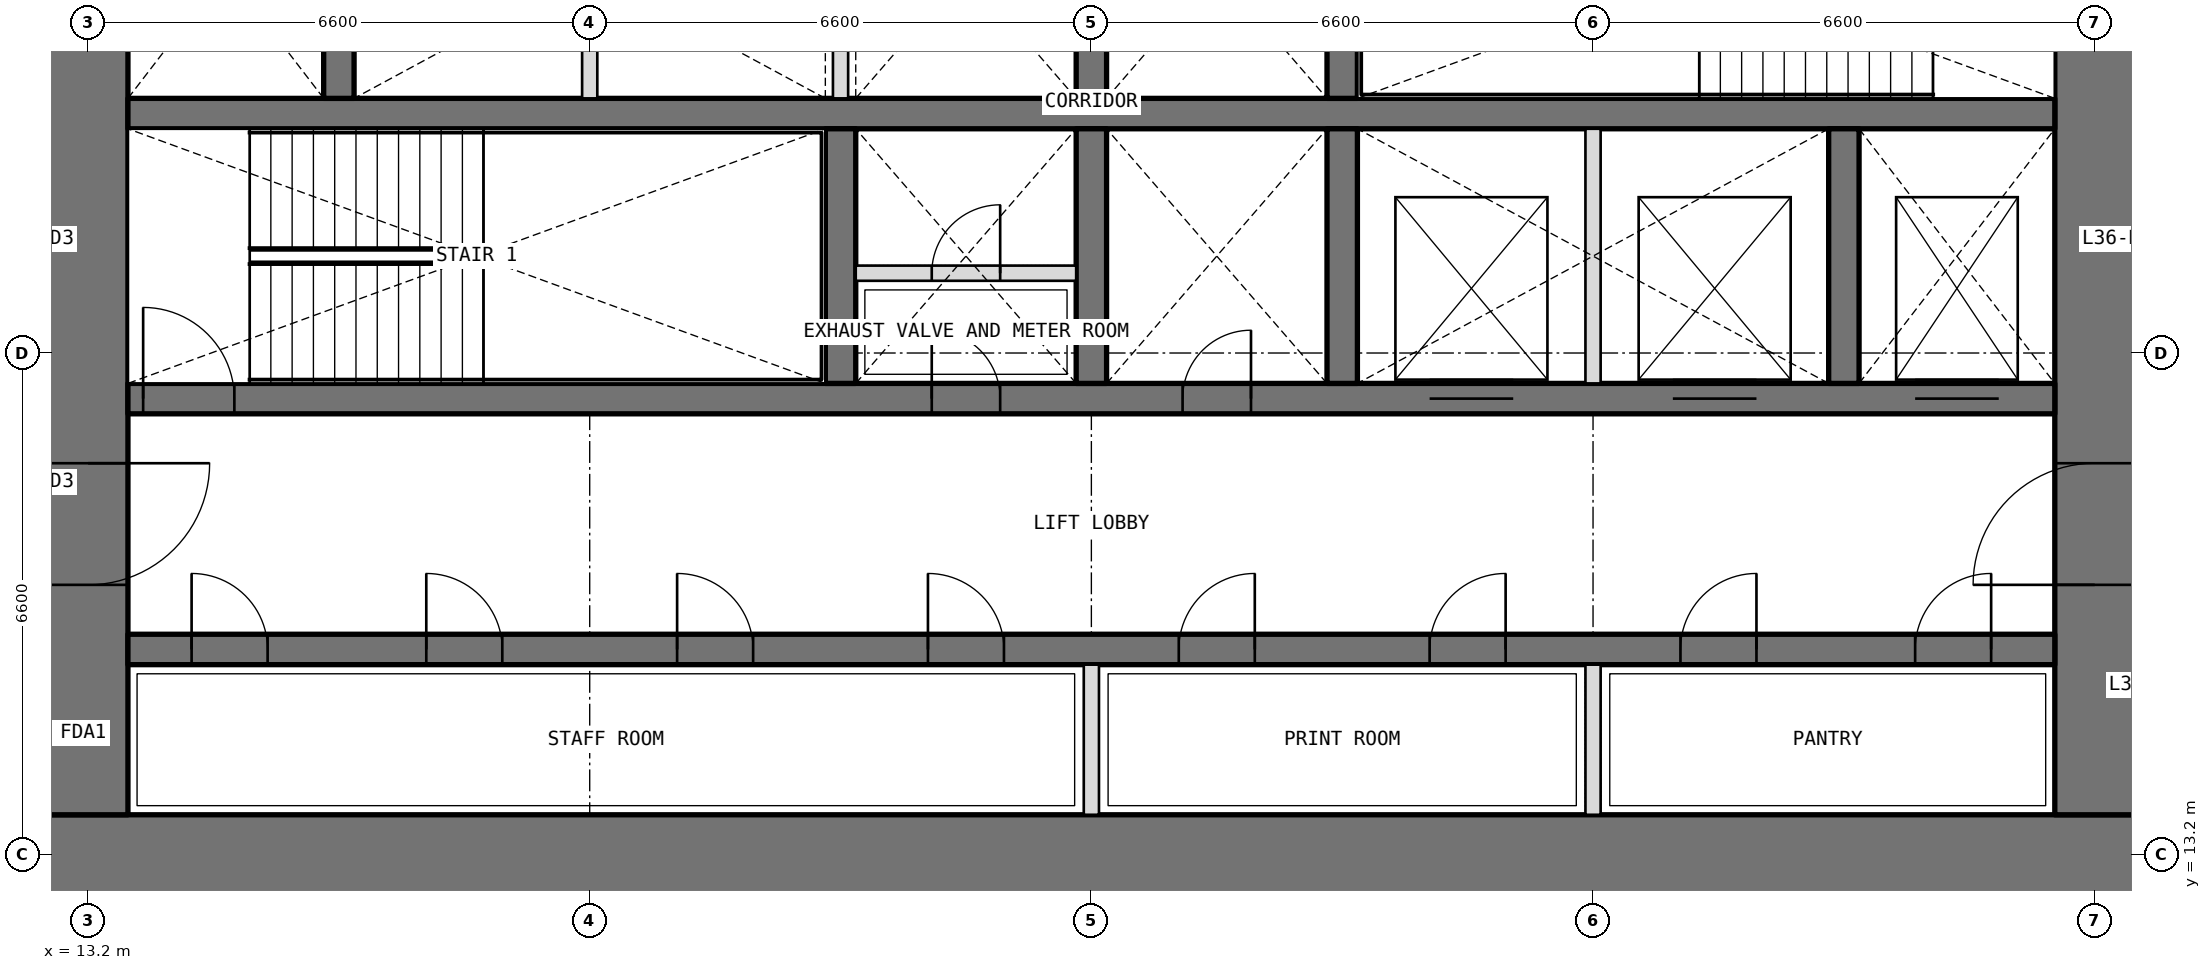
"""IFC4 building model, lengths in metres.
Left out: names, types, materials, properties, quantities, classifications, styles, units other than length and angle.
Written with IfcOpenShell. Run it as: python <this file> out.ifc"""

import sys

from ifc_helpers import new_model, si_unit, direction, frame, frame_2d, origin, place, context, subcontext, project, spatial, rectangle, extrude, element, fill, save


model = new_model("IFC4")
c1 = context("Model", 3, precision=1e-05, world=origin(), true_north=direction((0.0, 1.0)))
c2 = subcontext(c1, "Body", "Model", "MODEL_VIEW")
j1 = project(units=[si_unit("LENGTHUNIT", "METRE"), si_unit("PLANEANGLEUNIT", "RADIAN")], contexts=[c1])
p1 = place(None, origin())
s1 = spatial("IfcSite", under=j1, at=p1, CompositionType="ELEMENT")
p2 = place(p1, origin())
s2 = spatial("IfcBuilding", under=s1, at=p2, CompositionType="ELEMENT")
p3 = place(p2, frame((0.0, 0.0, 159.9)))
s3 = spatial("IfcBuildingStorey", under=s2, at=p3, CompositionType="ELEMENT", Elevation=159.9)
p4 = place(p3, frame((12.675, 13.2, 0.0), z_axis=(0.0, 0.0, 1.0), x_axis=(1.0, 0.0, 0.0)))
e1 = element("IfcWall", 1, at=p4, inside=s3, PredefinedType="SHEAR", context=c2, shape_type="SweptSolid", body=[
    extrude(rectangle(XDim=27.45, YDim=1.05, at=frame_2d((13.725, 0.0))), origin(), (0.0, 0.0, 1.0), 4.2),
])
p5 = place(p3, frame((39.6, 13.725, 0.0), z_axis=(0.0, 0.0, 1.0), x_axis=(0.0, 1.0, 0.0)))
e2 = element("IfcWall", 2, at=p5, inside=s3, PredefinedType="SHEAR", context=c2, shape_type="SweptSolid", body=[
    extrude(rectangle(XDim=18.75, YDim=1.05, at=frame_2d((9.375, 0.0))), origin(), (0.0, 0.0, 1.0), 4.2),
])
p6 = place(p5, frame((3.025, 0.0, 0.0)))
e3 = element("IfcOpeningElement", 3, at=p6, cuts=e2, PredefinedType="OPENING", context=c2, shape_type="SweptSolid", body=[
    extrude(rectangle(XDim=1.6, YDim=2.1, at=frame_2d((0.8, 1.05))), frame((0.0, 0.535, 0.0), z_axis=(0.0, -1.0, 0.0), x_axis=(1.0, 0.0, 0.0)), (0.0, 0.0, 1.0), 1.07),
])
p7 = place(p5, frame((13.825, 0.0, 0.0)))
e4 = element("IfcOpeningElement", 4, at=p7, cuts=e2, PredefinedType="OPENING", context=c2, shape_type="SweptSolid", body=[
    extrude(rectangle(XDim=1.6, YDim=2.1, at=frame_2d((0.8, 1.05))), frame((0.0, 0.535, 0.0), z_axis=(0.0, -1.0, 0.0), x_axis=(1.0, 0.0, 0.0)), (0.0, 0.0, 1.0), 1.07),
])
p8 = place(p3, frame((13.2, 32.475, 0.0), z_axis=(0.0, 0.0, 1.0), x_axis=(0.0, -1.0, 0.0)))
e5 = element("IfcWall", 5, at=p8, inside=s3, PredefinedType="SHEAR", context=c2, shape_type="SweptSolid", body=[
    extrude(rectangle(XDim=18.75, YDim=1.05, at=frame_2d((9.375, 0.0))), origin(), (0.0, 0.0, 1.0), 4.2),
])
p9 = place(p8, frame((14.125, 0.0, 0.0)))
e6 = element("IfcOpeningElement", 6, at=p9, cuts=e5, PredefinedType="OPENING", context=c2, shape_type="SweptSolid", body=[
    extrude(rectangle(XDim=1.6, YDim=2.1, at=frame_2d((0.8, 1.05))), frame((0.0, 0.535, 0.0), z_axis=(0.0, -1.0, 0.0), x_axis=(1.0, 0.0, 0.0)), (0.0, 0.0, 1.0), 1.07),
])
p10 = place(p8, frame((3.325, 0.0, 0.0)))
e7 = element("IfcOpeningElement", 7, at=p10, cuts=e5, PredefinedType="OPENING", context=c2, shape_type="SweptSolid", body=[
    extrude(rectangle(XDim=1.6, YDim=2.1, at=frame_2d((0.8, 1.05))), frame((0.0, 0.535, 0.0), z_axis=(0.0, -1.0, 0.0), x_axis=(1.0, 0.0, 0.0)), (0.0, 0.0, 1.0), 1.07),
])
p11 = place(p3, frame((13.725, 15.9, 0.0), z_axis=(0.0, 0.0, 1.0), x_axis=(1.0, 0.0, 0.0)))
e8 = element("IfcWall", 8, at=p11, inside=s3, PredefinedType="SHEAR", context=c2, shape_type="SweptSolid", body=[
    extrude(rectangle(XDim=25.35, YDim=0.4, at=frame_2d((12.675, 0.0))), origin(), (0.0, 0.0, 1.0), 4.2),
])
p12 = place(p11, frame((0.837, 0.0, 0.0)))
e9 = element("IfcOpeningElement", 9, at=p12, cuts=e8, PredefinedType="OPENING", context=c2, shape_type="SweptSolid", body=[
    extrude(rectangle(XDim=1.0, YDim=2.1, at=frame_2d((0.5, 1.05))), frame((0.0, 0.21, 0.0), z_axis=(0.0, -1.0, 0.0), x_axis=(1.0, 0.0, 0.0)), (0.0, 0.0, 1.0), 0.42),
])
p13 = place(p11, frame((3.925, 0.0, 0.0)))
e10 = element("IfcOpeningElement", 10, at=p13, cuts=e8, PredefinedType="OPENING", context=c2, shape_type="SweptSolid", body=[
    extrude(rectangle(XDim=1.0, YDim=2.1, at=frame_2d((0.5, 1.05))), frame((0.0, 0.21, 0.0), z_axis=(0.0, -1.0, 0.0), x_axis=(1.0, 0.0, 0.0)), (0.0, 0.0, 1.0), 0.42),
])
p14 = place(p11, frame((7.225, 0.0, 0.0)))
e11 = element("IfcOpeningElement", 11, at=p14, cuts=e8, PredefinedType="OPENING", context=c2, shape_type="SweptSolid", body=[
    extrude(rectangle(XDim=1.0, YDim=2.1, at=frame_2d((0.5, 1.05))), frame((0.0, 0.21, 0.0), z_axis=(0.0, -1.0, 0.0), x_axis=(1.0, 0.0, 0.0)), (0.0, 0.0, 1.0), 0.42),
])
p15 = place(p11, frame((10.525, 0.0, 0.0)))
e12 = element("IfcOpeningElement", 12, at=p15, cuts=e8, PredefinedType="OPENING", context=c2, shape_type="SweptSolid", body=[
    extrude(rectangle(XDim=1.0, YDim=2.1, at=frame_2d((0.5, 1.05))), frame((0.0, 0.21, 0.0), z_axis=(0.0, -1.0, 0.0), x_axis=(1.0, 0.0, 0.0)), (0.0, 0.0, 1.0), 0.42),
])
p16 = place(p11, frame((13.825, 0.0, 0.0)))
e13 = element("IfcOpeningElement", 13, at=p16, cuts=e8, PredefinedType="OPENING", context=c2, shape_type="SweptSolid", body=[
    extrude(rectangle(XDim=1.0, YDim=2.1, at=frame_2d((0.5, 1.05))), frame((0.0, 0.21, 0.0), z_axis=(0.0, -1.0, 0.0), x_axis=(1.0, 0.0, 0.0)), (0.0, 0.0, 1.0), 0.42),
])
p17 = place(p11, frame((17.125, 0.0, 0.0)))
e14 = element("IfcOpeningElement", 14, at=p17, cuts=e8, PredefinedType="OPENING", context=c2, shape_type="SweptSolid", body=[
    extrude(rectangle(XDim=1.0, YDim=2.1, at=frame_2d((0.5, 1.05))), frame((0.0, 0.21, 0.0), z_axis=(0.0, -1.0, 0.0), x_axis=(1.0, 0.0, 0.0)), (0.0, 0.0, 1.0), 0.42),
])
p18 = place(p11, frame((20.425, 0.0, 0.0)))
e15 = element("IfcOpeningElement", 15, at=p18, cuts=e8, PredefinedType="OPENING", context=c2, shape_type="SweptSolid", body=[
    extrude(rectangle(XDim=1.0, YDim=2.1, at=frame_2d((0.5, 1.05))), frame((0.0, 0.21, 0.0), z_axis=(0.0, -1.0, 0.0), x_axis=(1.0, 0.0, 0.0)), (0.0, 0.0, 1.0), 0.42),
])
p19 = place(p11, frame((23.512, 0.0, 0.0)))
e16 = element("IfcOpeningElement", 16, at=p19, cuts=e8, PredefinedType="OPENING", context=c2, shape_type="SweptSolid", body=[
    extrude(rectangle(XDim=1.0, YDim=2.1, at=frame_2d((0.5, 1.05))), frame((0.0, 0.21, 0.0), z_axis=(0.0, -1.0, 0.0), x_axis=(1.0, 0.0, 0.0)), (0.0, 0.0, 1.0), 0.42),
])
p20 = place(p3, frame((13.725, 19.2, 0.0), z_axis=(0.0, 0.0, 1.0), x_axis=(1.0, 0.0, 0.0)))
e17 = element("IfcWall", 17, at=p20, inside=s3, PredefinedType="SHEAR", context=c2, shape_type="SweptSolid", body=[
    extrude(rectangle(XDim=25.35, YDim=0.4, at=frame_2d((12.675, 0.0))), origin(), (0.0, 0.0, 1.0), 4.2),
])
p21 = place(p20, frame((10.575, 0.0, 0.0)))
e18 = element("IfcOpeningElement", 18, at=p21, cuts=e17, PredefinedType="OPENING", context=c2, shape_type="SweptSolid", body=[
    extrude(rectangle(XDim=0.9, YDim=2.1, at=frame_2d((0.45, 1.05))), frame((0.0, 0.21, 0.0), z_axis=(0.0, -1.0, 0.0), x_axis=(1.0, 0.0, 0.0)), (0.0, 0.0, 1.0), 0.42),
])
p22 = place(p20, frame((13.875, 0.0, 0.0)))
e19 = element("IfcOpeningElement", 19, at=p22, cuts=e17, PredefinedType="OPENING", context=c2, shape_type="SweptSolid", body=[
    extrude(rectangle(XDim=0.9, YDim=2.1, at=frame_2d((0.45, 1.05))), frame((0.0, 0.21, 0.0), z_axis=(0.0, -1.0, 0.0), x_axis=(1.0, 0.0, 0.0)), (0.0, 0.0, 1.0), 0.42),
])
p23 = place(p20, frame((0.2, 0.0, 0.0)))
e20 = element("IfcOpeningElement", 20, at=p23, cuts=e17, PredefinedType="OPENING", context=c2, shape_type="SweptSolid", body=[
    extrude(rectangle(XDim=1.2, YDim=2.1, at=frame_2d((0.6, 1.05))), frame((0.0, 0.21, 0.0), z_axis=(0.0, -1.0, 0.0), x_axis=(1.0, 0.0, 0.0)), (0.0, 0.0, 1.0), 0.42),
])
p24 = place(p20, frame((23.512, 0.0, 0.0)))
e21 = element("IfcOpeningElement", 21, at=p24, cuts=e17, PredefinedType="OPENING", context=c2, shape_type="SweptSolid", body=[
    extrude(rectangle(XDim=1.1, YDim=2.1, at=frame_2d((0.55, 1.05))), frame((0.0, 0.21, 0.0), z_axis=(0.0, -1.0, 0.0), x_axis=(1.0, 0.0, 0.0)), (0.0, 0.0, 1.0), 0.42),
])
p25 = place(p20, frame((17.125, 0.0, 0.0)))
e22 = element("IfcOpeningElement", 22, at=p25, cuts=e17, PredefinedType="OPENING", context=c2, shape_type="SweptSolid", body=[
    extrude(rectangle(XDim=1.1, YDim=2.1, at=frame_2d((0.55, 1.05))), frame((0.0, 0.21, 0.0), z_axis=(0.0, -1.0, 0.0), x_axis=(1.0, 0.0, 0.0)), (0.0, 0.0, 1.0), 0.42),
])
p26 = place(p20, frame((20.325, 0.0, 0.0)))
e23 = element("IfcOpeningElement", 23, at=p26, cuts=e17, PredefinedType="OPENING", context=c2, shape_type="SweptSolid", body=[
    extrude(rectangle(XDim=1.1, YDim=2.1, at=frame_2d((0.55, 1.05))), frame((0.0, 0.21, 0.0), z_axis=(0.0, -1.0, 0.0), x_axis=(1.0, 0.0, 0.0)), (0.0, 0.0, 1.0), 0.42),
])
p27 = place(p3, frame((13.725, 22.95, 0.0), z_axis=(0.0, 0.0, 1.0), x_axis=(1.0, 0.0, 0.0)))
e24 = element("IfcWall", 24, at=p27, inside=s3, PredefinedType="SHEAR", context=c2, shape_type="SweptSolid", body=[
    extrude(rectangle(XDim=25.35, YDim=0.4, at=frame_2d((12.675, 0.0))), origin(), (0.0, 0.0, 1.0), 4.2),
])
for number, where, z_axis, x_axis in (
    (25, (23.1, 19.4, 0.0), (0.0, 0.0, 1.0), (0.0, 1.0, 0.0)),
    (26, (26.4, 19.4, 0.0), (0.0, 0.0, 1.0), (0.0, 1.0, 0.0)),
    (27, (29.7, 19.4, 0.0), (0.0, 0.0, 1.0), (0.0, 1.0, 0.0)),
    (28, (36.3, 19.4, 0.0), (0.0, 0.0, 1.0), (0.0, 1.0, 0.0)),
    (29, (16.5, 23.15, 0.0), (0.0, 0.0, 1.0), (0.0, 1.0, 0.0)),
    (30, (26.4, 23.15, 0.0), (0.0, 0.0, 1.0), (0.0, 1.0, 0.0)),
    (31, (29.7, 23.15, 0.0), (0.0, 0.0, 1.0), (0.0, 1.0, 0.0)),
):
    element("IfcWall", number, at=place(p3, frame(where, z_axis=z_axis, x_axis=x_axis)), inside=s3, PredefinedType="SHEAR", context=c2, shape_type="SweptSolid", body=[
        extrude(rectangle(XDim=3.35, YDim=0.4, at=frame_2d((1.675, 0.0))), origin(), (0.0, 0.0, 1.0), 4.2),
    ])
for number, where, z_axis, x_axis in (
    (32, (26.4, 13.725, 0.0), (0.0, 0.0, 1.0), (0.0, 1.0, 0.0)),
    (33, (33.0, 13.725, 0.0), (0.0, 0.0, 1.0), (0.0, 1.0, 0.0)),
):
    element("IfcWall", number, at=place(p3, frame(where, z_axis=z_axis, x_axis=x_axis)), inside=s3, PredefinedType="PARTITIONING", context=c2, shape_type="SweptSolid", body=[
        extrude(rectangle(XDim=1.975, YDim=0.2, at=frame_2d((0.987, 0.0))), origin(), (0.0, 0.0, 1.0), 4.2),
    ])
for number, where, z_axis, x_axis in (
    (34, (33.0, 19.4, 0.0), (0.0, 0.0, 1.0), (0.0, 1.0, 0.0)),
    (35, (19.8, 23.15, 0.0), (0.0, 0.0, 1.0), (0.0, 1.0, 0.0)),
    (36, (23.1, 23.15, 0.0), (0.0, 0.0, 1.0), (0.0, 1.0, 0.0)),
):
    element("IfcWall", number, at=place(p3, frame(where, z_axis=z_axis, x_axis=x_axis)), inside=s3, PredefinedType="PARTITIONING", context=c2, shape_type="SweptSolid", body=[
        extrude(rectangle(XDim=3.35, YDim=0.2, at=frame_2d((1.675, 0.0))), origin(), (0.0, 0.0, 1.0), 4.2),
    ])
p28 = place(p3, frame((23.3, 20.85, 0.0), z_axis=(0.0, 0.0, 1.0), x_axis=(1.0, 0.0, 0.0)))
e37 = element("IfcWall", 37, at=p28, inside=s3, PredefinedType="PARTITIONING", context=c2, shape_type="SweptSolid", body=[
    extrude(rectangle(XDim=2.9, YDim=0.2, at=frame_2d((1.45, 0.0))), origin(), (0.0, 0.0, 1.0), 3.9),
])
p29 = place(p28, frame((1.0, 0.0, 0.0)))
e38 = element("IfcOpeningElement", 38, at=p29, cuts=e37, PredefinedType="OPENING", context=c2, shape_type="SweptSolid", body=[
    extrude(rectangle(XDim=0.9, YDim=2.1, at=frame_2d((0.45, 1.05))), frame((0.0, 0.11, 0.0), z_axis=(0.0, -1.0, 0.0), x_axis=(1.0, 0.0, 0.0)), (0.0, 0.0, 1.0), 0.22),
])
p30 = place(p21, origin())
e39 = element("IfcDoor", 39, at=p30, inside=s3, OperationType="SINGLE_SWING_LEFT", PredefinedType="DOOR", context=c2, shape_type="SweptSolid", body=[
    extrude(rectangle(XDim=0.9, YDim=2.1, at=frame_2d((0.45, 1.05))), frame((0.0, 0.025, 0.0), z_axis=(0.0, -1.0, 0.0), x_axis=(1.0, 0.0, 0.0)), (0.0, 0.0, 1.0), 0.05),
])
fill(e18, e39)
p31 = place(p29, origin())
e40 = element("IfcDoor", 40, at=p31, inside=s3, OperationType="SINGLE_SWING_RIGHT", PredefinedType="DOOR", context=c2, shape_type="SweptSolid", body=[
    extrude(rectangle(XDim=0.9, YDim=2.1, at=frame_2d((0.45, 1.05))), frame((0.0, 0.025, 0.0), z_axis=(0.0, -1.0, 0.0), x_axis=(1.0, 0.0, 0.0)), (0.0, 0.0, 1.0), 0.05),
])
fill(e38, e40)
p32 = place(p22, origin())
e41 = element("IfcDoor", 41, at=p32, inside=s3, OperationType="SINGLE_SWING_RIGHT", PredefinedType="DOOR", context=c2, shape_type="SweptSolid", body=[
    extrude(rectangle(XDim=0.9, YDim=2.1, at=frame_2d((0.45, 1.05))), frame((0.0, 0.025, 0.0), z_axis=(0.0, -1.0, 0.0), x_axis=(1.0, 0.0, 0.0)), (0.0, 0.0, 1.0), 0.05),
])
fill(e19, e41)
p33 = place(p12, origin())
e42 = element("IfcDoor", 42, at=p33, inside=s3, OperationType="SINGLE_SWING_LEFT", PredefinedType="DOOR", context=c2, shape_type="SweptSolid", body=[
    extrude(rectangle(XDim=1.0, YDim=2.1, at=frame_2d((0.5, 1.05))), frame((0.0, 0.025, 0.0), z_axis=(0.0, -1.0, 0.0), x_axis=(1.0, 0.0, 0.0)), (0.0, 0.0, 1.0), 0.05),
])
fill(e9, e42)
p34 = place(p13, origin())
e43 = element("IfcDoor", 43, at=p34, inside=s3, OperationType="SINGLE_SWING_LEFT", PredefinedType="DOOR", context=c2, shape_type="SweptSolid", body=[
    extrude(rectangle(XDim=1.0, YDim=2.1, at=frame_2d((0.5, 1.05))), frame((0.0, 0.025, 0.0), z_axis=(0.0, -1.0, 0.0), x_axis=(1.0, 0.0, 0.0)), (0.0, 0.0, 1.0), 0.05),
])
fill(e10, e43)
p35 = place(p14, origin())
e44 = element("IfcDoor", 44, at=p35, inside=s3, OperationType="SINGLE_SWING_LEFT", PredefinedType="DOOR", context=c2, shape_type="SweptSolid", body=[
    extrude(rectangle(XDim=1.0, YDim=2.1, at=frame_2d((0.5, 1.05))), frame((0.0, 0.025, 0.0), z_axis=(0.0, -1.0, 0.0), x_axis=(1.0, 0.0, 0.0)), (0.0, 0.0, 1.0), 0.05),
])
fill(e11, e44)
p36 = place(p15, origin())
e45 = element("IfcDoor", 45, at=p36, inside=s3, OperationType="SINGLE_SWING_LEFT", PredefinedType="DOOR", context=c2, shape_type="SweptSolid", body=[
    extrude(rectangle(XDim=1.0, YDim=2.1, at=frame_2d((0.5, 1.05))), frame((0.0, 0.025, 0.0), z_axis=(0.0, -1.0, 0.0), x_axis=(1.0, 0.0, 0.0)), (0.0, 0.0, 1.0), 0.05),
])
fill(e12, e45)
p37 = place(p16, origin())
e46 = element("IfcDoor", 46, at=p37, inside=s3, OperationType="SINGLE_SWING_RIGHT", PredefinedType="DOOR", context=c2, shape_type="SweptSolid", body=[
    extrude(rectangle(XDim=1.0, YDim=2.1, at=frame_2d((0.5, 1.05))), frame((0.0, 0.025, 0.0), z_axis=(0.0, -1.0, 0.0), x_axis=(1.0, 0.0, 0.0)), (0.0, 0.0, 1.0), 0.05),
])
fill(e13, e46)
p38 = place(p17, origin())
e47 = element("IfcDoor", 47, at=p38, inside=s3, OperationType="SINGLE_SWING_RIGHT", PredefinedType="DOOR", context=c2, shape_type="SweptSolid", body=[
    extrude(rectangle(XDim=1.0, YDim=2.1, at=frame_2d((0.5, 1.05))), frame((0.0, 0.025, 0.0), z_axis=(0.0, -1.0, 0.0), x_axis=(1.0, 0.0, 0.0)), (0.0, 0.0, 1.0), 0.05),
])
fill(e14, e47)
p39 = place(p18, origin())
e48 = element("IfcDoor", 48, at=p39, inside=s3, OperationType="SINGLE_SWING_RIGHT", PredefinedType="DOOR", context=c2, shape_type="SweptSolid", body=[
    extrude(rectangle(XDim=1.0, YDim=2.1, at=frame_2d((0.5, 1.05))), frame((0.0, 0.025, 0.0), z_axis=(0.0, -1.0, 0.0), x_axis=(1.0, 0.0, 0.0)), (0.0, 0.0, 1.0), 0.05),
])
fill(e15, e48)
p40 = place(p19, origin())
e49 = element("IfcDoor", 49, at=p40, inside=s3, OperationType="SINGLE_SWING_RIGHT", PredefinedType="DOOR", context=c2, shape_type="SweptSolid", body=[
    extrude(rectangle(XDim=1.0, YDim=2.1, at=frame_2d((0.5, 1.05))), frame((0.0, 0.025, 0.0), z_axis=(0.0, -1.0, 0.0), x_axis=(1.0, 0.0, 0.0)), (0.0, 0.0, 1.0), 0.05),
])
fill(e16, e49)
p41 = place(p23, origin())
e50 = element("IfcDoor", 50, at=p41, inside=s3, OperationType="SINGLE_SWING_LEFT", PredefinedType="DOOR", context=c2, shape_type="SweptSolid", body=[
    extrude(rectangle(XDim=1.2, YDim=2.1, at=frame_2d((0.6, 1.05))), frame((0.0, 0.025, 0.0), z_axis=(0.0, -1.0, 0.0), x_axis=(1.0, 0.0, 0.0)), (0.0, 0.0, 1.0), 0.05),
])
fill(e20, e50)
p42 = place(p9, origin())
e51 = element("IfcDoor", 51, at=p42, inside=s3, OperationType="DOUBLE_DOOR_DOUBLE_SWING", PredefinedType="DOOR", context=c2, shape_type="SweptSolid", body=[
    extrude(rectangle(XDim=1.6, YDim=2.1, at=frame_2d((0.8, 1.05))), frame((0.0, 0.025, 0.0), z_axis=(0.0, -1.0, 0.0), x_axis=(1.0, 0.0, 0.0)), (0.0, 0.0, 1.0), 0.05),
])
fill(e6, e51)
p43 = place(p6, origin())
e52 = element("IfcDoor", 52, at=p43, inside=s3, OperationType="DOUBLE_DOOR_DOUBLE_SWING", PredefinedType="DOOR", context=c2, shape_type="SweptSolid", body=[
    extrude(rectangle(XDim=1.6, YDim=2.1, at=frame_2d((0.8, 1.05))), frame((0.0, 0.025, 0.0), z_axis=(0.0, -1.0, 0.0), x_axis=(1.0, 0.0, 0.0)), (0.0, 0.0, 1.0), 0.05),
])
fill(e3, e52)
p44 = place(p24, origin())
e53 = element("IfcDoor", 53, at=p44, inside=s3, OperationType="DOUBLE_DOOR_SLIDING", PredefinedType="DOOR", context=c2, shape_type="SweptSolid", body=[
    extrude(rectangle(XDim=1.1, YDim=2.1, at=frame_2d((0.55, 1.05))), frame((0.0, 0.025, 0.0), z_axis=(0.0, -1.0, 0.0), x_axis=(1.0, 0.0, 0.0)), (0.0, 0.0, 1.0), 0.05),
])
fill(e21, e53)
p45 = place(p25, origin())
e54 = element("IfcDoor", 54, at=p45, inside=s3, OperationType="DOUBLE_DOOR_SLIDING", PredefinedType="DOOR", context=c2, shape_type="SweptSolid", body=[
    extrude(rectangle(XDim=1.1, YDim=2.1, at=frame_2d((0.55, 1.05))), frame((0.0, 0.025, 0.0), z_axis=(0.0, -1.0, 0.0), x_axis=(1.0, 0.0, 0.0)), (0.0, 0.0, 1.0), 0.05),
])
fill(e22, e54)
p46 = place(p26, origin())
e55 = element("IfcDoor", 55, at=p46, inside=s3, OperationType="DOUBLE_DOOR_SLIDING", PredefinedType="DOOR", context=c2, shape_type="SweptSolid", body=[
    extrude(rectangle(XDim=1.1, YDim=2.1, at=frame_2d((0.55, 1.05))), frame((0.0, 0.025, 0.0), z_axis=(0.0, -1.0, 0.0), x_axis=(1.0, 0.0, 0.0)), (0.0, 0.0, 1.0), 0.05),
])
fill(e23, e55)
save(model, sys.argv[1])
